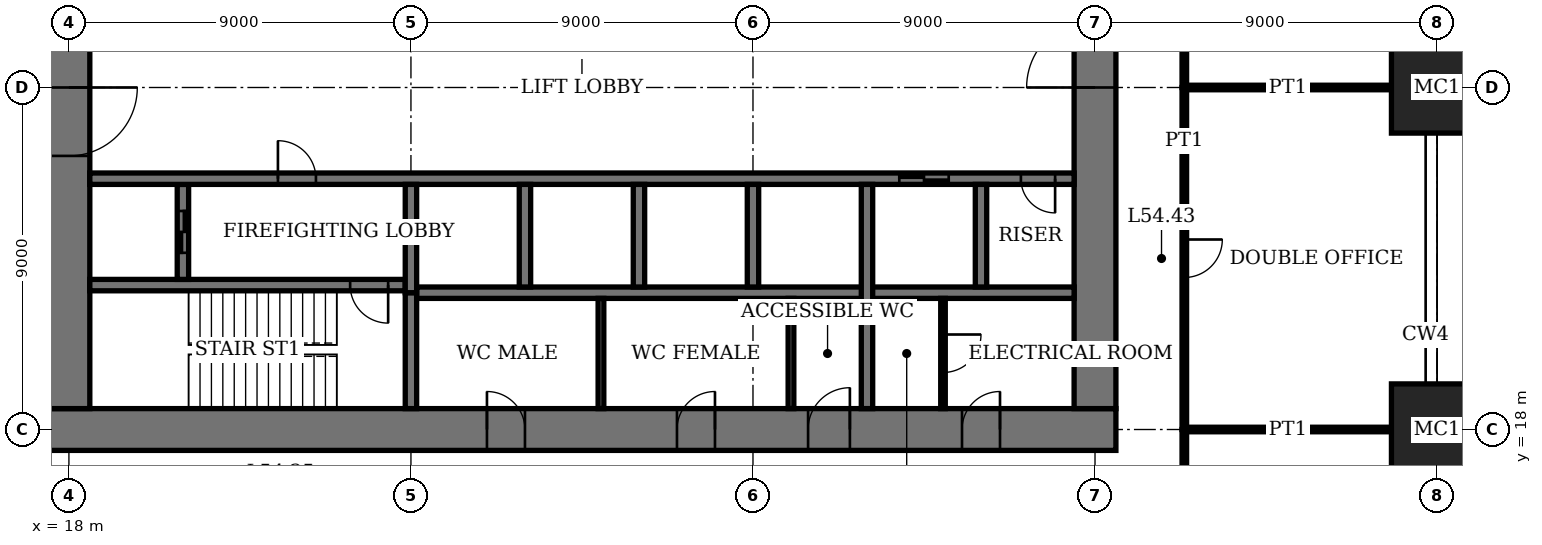
"""IFC4 building model, lengths in metres.
Left out: names, types, materials, properties, quantities, classifications, styles, units other than length and angle.
Written with IfcOpenShell. Run it as: python <this file> out.ifc"""

import sys

from ifc_helpers import new_model, si_unit, direction, frame, frame_2d, origin, origin_2d, place, context, subcontext, project, spatial, rectangle, extrude, element, fill, save


model = new_model("IFC4")
c1 = context("Model", 3, precision=1e-05, world=origin(), true_north=direction((0.0, 1.0)))
c2 = subcontext(c1, "Body", "Model", "MODEL_VIEW")
j1 = project(units=[si_unit("LENGTHUNIT", "METRE"), si_unit("PLANEANGLEUNIT", "RADIAN")], contexts=[c1])
p1 = place(None, origin())
s1 = spatial("IfcSite", under=j1, at=p1, CompositionType="ELEMENT")
p2 = place(p1, origin())
s2 = spatial("IfcBuilding", under=s1, at=p2, CompositionType="ELEMENT")
p3 = place(p2, frame((0.0, 0.0, 222.2)))
s3 = spatial("IfcBuildingStorey", under=s2, at=p3, CompositionType="ELEMENT", Elevation=222.2)
for number, where, z_axis, x_axis in (
    (1, (54.0, 18.0, 0.0), (0.0, 0.0, 1.0), (1.0, 0.0, 0.0)),
    (2, (54.0, 27.0, 0.0), (0.0, 0.0, 1.0), (1.0, 0.0, 0.0)),
):
    element("IfcColumn", number, at=place(p3, frame(where, z_axis=z_axis, x_axis=x_axis)), inside=s3, PredefinedType="COLUMN", context=c2, shape_type="SweptSolid", body=[
        extrude(rectangle(XDim=2.4, YDim=2.4, at=origin_2d()), origin(), (0.0, 0.0, 1.0), 4.0),
    ])
p4 = place(p3, frame((17.45, 18.0, 0.0), z_axis=(0.0, 0.0, 1.0), x_axis=(1.0, 0.0, 0.0)))
e3 = element("IfcWall", 3, at=p4, inside=s3, PredefinedType="SHEAR", context=c2, shape_type="SweptSolid", body=[
    extrude(rectangle(XDim=28.1, YDim=1.1, at=frame_2d((14.05, 0.0))), origin(), (0.0, 0.0, 1.0), 4.0),
])
p5 = place(p4, frame((11.55, 0.0, 0.0)))
e4 = element("IfcOpeningElement", 4, at=p5, cuts=e3, PredefinedType="OPENING", context=c2, shape_type="SweptSolid", body=[
    extrude(rectangle(XDim=1.0, YDim=2.4, at=frame_2d((0.5, 1.2))), frame((0.0, 0.56, 0.0), z_axis=(0.0, -1.0, 0.0), x_axis=(1.0, 0.0, 0.0)), (0.0, 0.0, 1.0), 1.12),
])
p6 = place(p4, frame((16.55, 0.0, 0.0)))
e5 = element("IfcOpeningElement", 5, at=p6, cuts=e3, PredefinedType="OPENING", context=c2, shape_type="SweptSolid", body=[
    extrude(rectangle(XDim=1.0, YDim=2.4, at=frame_2d((0.5, 1.2))), frame((0.0, 0.56, 0.0), z_axis=(0.0, -1.0, 0.0), x_axis=(1.0, 0.0, 0.0)), (0.0, 0.0, 1.0), 1.12),
])
p7 = place(p4, frame((20.0, 0.0, 0.0)))
e6 = element("IfcOpeningElement", 6, at=p7, cuts=e3, PredefinedType="OPENING", context=c2, shape_type="SweptSolid", body=[
    extrude(rectangle(XDim=1.1, YDim=2.4, at=frame_2d((0.55, 1.2))), frame((0.0, 0.56, 0.0), z_axis=(0.0, -1.0, 0.0), x_axis=(1.0, 0.0, 0.0)), (0.0, 0.0, 1.0), 1.12),
])
p8 = place(p4, frame((24.05, 0.0, 0.0)))
e7 = element("IfcOpeningElement", 7, at=p8, cuts=e3, PredefinedType="OPENING", context=c2, shape_type="SweptSolid", body=[
    extrude(rectangle(XDim=1.0, YDim=2.4, at=frame_2d((0.5, 1.2))), frame((0.0, 0.56, 0.0), z_axis=(0.0, -1.0, 0.0), x_axis=(1.0, 0.0, 0.0)), (0.0, 0.0, 1.0), 1.12),
])
p9 = place(p3, frame((18.0, 35.45, 0.0), z_axis=(0.0, 0.0, 1.0), x_axis=(0.0, -1.0, 0.0)))
e8 = element("IfcWall", 8, at=p9, inside=s3, PredefinedType="SHEAR", context=c2, shape_type="SweptSolid", body=[
    extrude(rectangle(XDim=16.9, YDim=1.1, at=frame_2d((8.45, 0.0))), origin(), (0.0, 0.0, 1.0), 4.0),
])
p10 = place(p9, frame((8.45, 0.0, 0.0)))
e9 = element("IfcOpeningElement", 9, at=p10, cuts=e8, PredefinedType="OPENING", context=c2, shape_type="SweptSolid", body=[
    extrude(rectangle(XDim=1.8, YDim=2.4, at=frame_2d((0.9, 1.2))), frame((0.0, 0.56, 0.0), z_axis=(0.0, -1.0, 0.0), x_axis=(1.0, 0.0, 0.0)), (0.0, 0.0, 1.0), 1.12),
])
p11 = place(p3, frame((45.0, 18.55, 0.0), z_axis=(0.0, 0.0, 1.0), x_axis=(0.0, 1.0, 0.0)))
e10 = element("IfcWall", 10, at=p11, inside=s3, PredefinedType="SHEAR", context=c2, shape_type="SweptSolid", body=[
    extrude(rectangle(XDim=16.9, YDim=1.1, at=frame_2d((8.45, 0.0))), origin(), (0.0, 0.0, 1.0), 4.0),
])
p12 = place(p11, frame((8.45, 0.0, 0.0)))
e11 = element("IfcOpeningElement", 11, at=p12, cuts=e10, PredefinedType="OPENING", context=c2, shape_type="SweptSolid", body=[
    extrude(rectangle(XDim=1.8, YDim=2.4, at=frame_2d((0.9, 1.2))), frame((0.0, 0.56, 0.0), z_axis=(0.0, -1.0, 0.0), x_axis=(1.0, 0.0, 0.0)), (0.0, 0.0, 1.0), 1.12),
])
p13 = place(p3, frame((18.55, 21.8, 0.0), z_axis=(0.0, 0.0, 1.0), x_axis=(1.0, 0.0, 0.0)))
e12 = element("IfcWall", 12, at=p13, inside=s3, PredefinedType="SHEAR", context=c2, shape_type="SweptSolid", body=[
    extrude(rectangle(XDim=8.3, YDim=0.3, at=frame_2d((4.15, 0.0))), origin(), (0.0, 0.0, 1.0), 4.0),
])
p14 = place(p13, frame((6.85, 0.0, 0.0)))
e13 = element("IfcOpeningElement", 13, at=p14, cuts=e12, PredefinedType="OPENING", context=c2, shape_type="SweptSolid", body=[
    extrude(rectangle(XDim=1.0, YDim=2.4, at=frame_2d((0.5, 1.2))), frame((0.0, 0.16, 0.0), z_axis=(0.0, -1.0, 0.0), x_axis=(1.0, 0.0, 0.0)), (0.0, 0.0, 1.0), 0.32),
])
p15 = place(p3, frame((27.0, 18.55, 0.0), z_axis=(0.0, 0.0, 1.0), x_axis=(0.0, 1.0, 0.0)))
e14 = element("IfcWall", 14, at=p15, inside=s3, PredefinedType="SHEAR", context=c2, shape_type="SweptSolid", body=[
    extrude(rectangle(XDim=3.05, YDim=0.3, at=frame_2d((1.525, 0.0))), origin(), (0.0, 0.0, 1.0), 4.0),
])
p16 = place(p3, frame((21.0, 21.95, 0.0), z_axis=(0.0, 0.0, 1.0), x_axis=(0.0, 1.0, 0.0)))
e15 = element("IfcWall", 15, at=p16, inside=s3, PredefinedType="SHEAR", context=c2, shape_type="SweptSolid", body=[
    extrude(rectangle(XDim=2.5, YDim=0.3, at=frame_2d((1.25, 0.0))), origin(), (0.0, 0.0, 1.0), 4.0),
])
p17 = place(p16, frame((0.7, 0.0, 0.0)))
e16 = element("IfcOpeningElement", 16, at=p17, cuts=e15, PredefinedType="OPENING", context=c2, shape_type="SweptSolid", body=[
    extrude(rectangle(XDim=1.1, YDim=2.4, at=frame_2d((0.55, 1.2))), frame((0.0, 0.16, 0.0), z_axis=(0.0, -1.0, 0.0), x_axis=(1.0, 0.0, 0.0)), (0.0, 0.0, 1.0), 0.32),
])
p18 = place(p3, frame((18.55, 24.6, 0.0), z_axis=(0.0, 0.0, 1.0), x_axis=(1.0, 0.0, 0.0)))
e17 = element("IfcWall", 17, at=p18, inside=s3, PredefinedType="SHEAR", context=c2, shape_type="SweptSolid", body=[
    extrude(rectangle(XDim=25.9, YDim=0.3, at=frame_2d((12.95, 0.0))), origin(), (0.0, 0.0, 1.0), 4.0),
])
p19 = place(p18, frame((4.95, 0.0, 0.0)))
e18 = element("IfcOpeningElement", 18, at=p19, cuts=e17, PredefinedType="OPENING", context=c2, shape_type="SweptSolid", body=[
    extrude(rectangle(XDim=1.0, YDim=2.4, at=frame_2d((0.5, 1.2))), frame((0.0, 0.16, 0.0), z_axis=(0.0, -1.0, 0.0), x_axis=(1.0, 0.0, 0.0)), (0.0, 0.0, 1.0), 0.32),
])
p20 = place(p18, frame((24.5, 0.0, 0.0)))
e19 = element("IfcOpeningElement", 19, at=p20, cuts=e17, PredefinedType="OPENING", context=c2, shape_type="SweptSolid", body=[
    extrude(rectangle(XDim=0.9, YDim=2.1, at=frame_2d((0.45, 1.05))), frame((0.0, 0.16, 0.0), z_axis=(0.0, -1.0, 0.0), x_axis=(1.0, 0.0, 0.0)), (0.0, 0.0, 1.0), 0.32),
])
p21 = place(p18, frame((21.3, 0.0, 0.0)))
e20 = element("IfcOpeningElement", 20, at=p21, cuts=e17, PredefinedType="OPENING", context=c2, shape_type="SweptSolid", body=[
    extrude(rectangle(XDim=1.3, YDim=2.4, at=frame_2d((0.65, 1.2))), frame((0.0, 0.16, 0.0), z_axis=(0.0, -1.0, 0.0), x_axis=(1.0, 0.0, 0.0)), (0.0, 0.0, 1.0), 0.32),
])
p22 = place(p3, frame((27.15, 21.6, 0.0), z_axis=(0.0, 0.0, 1.0), x_axis=(1.0, 0.0, 0.0)))
e21 = element("IfcWall", 21, at=p22, inside=s3, PredefinedType="SHEAR", context=c2, shape_type="SweptSolid", body=[
    extrude(rectangle(XDim=17.3, YDim=0.3, at=frame_2d((8.65, 0.0))), origin(), (0.0, 0.0, 1.0), 4.0),
])
for number, where, z_axis, x_axis in (
    (22, (30.0, 21.75, 0.0), (0.0, 0.0, 1.0), (0.0, 1.0, 0.0)),
    (23, (33.0, 21.75, 0.0), (0.0, 0.0, 1.0), (0.0, 1.0, 0.0)),
    (24, (36.0, 21.75, 0.0), (0.0, 0.0, 1.0), (0.0, 1.0, 0.0)),
):
    element("IfcWall", number, at=place(p3, frame(where, z_axis=z_axis, x_axis=x_axis)), inside=s3, PredefinedType="SHEAR", context=c2, shape_type="SweptSolid", body=[
        extrude(rectangle(XDim=2.7, YDim=0.3, at=frame_2d((1.35, 0.0))), origin(), (0.0, 0.0, 1.0), 4.0),
    ])
p23 = place(p3, frame((39.0, 18.55, 0.0), z_axis=(0.0, 0.0, 1.0), x_axis=(0.0, 1.0, 0.0)))
e25 = element("IfcWall", 25, at=p23, inside=s3, PredefinedType="SHEAR", context=c2, shape_type="SweptSolid", body=[
    extrude(rectangle(XDim=5.9, YDim=0.3, at=frame_2d((2.95, 0.0))), origin(), (0.0, 0.0, 1.0), 4.0),
])
p24 = place(p3, frame((42.0, 21.75, 0.0), z_axis=(0.0, 0.0, 1.0), x_axis=(0.0, 1.0, 0.0)))
e26 = element("IfcWall", 26, at=p24, inside=s3, PredefinedType="SHEAR", context=c2, shape_type="SweptSolid", body=[
    extrude(rectangle(XDim=2.7, YDim=0.3, at=frame_2d((1.35, 0.0))), origin(), (0.0, 0.0, 1.0), 4.0),
])
p25 = place(p3, frame((27.0, 21.6, 0.0), z_axis=(0.0, 0.0, 1.0), x_axis=(0.0, 1.0, 0.0)))
e27 = element("IfcWall", 27, at=p25, inside=s3, PredefinedType="SHEAR", context=c2, shape_type="SweptSolid", body=[
    extrude(rectangle(XDim=2.85, YDim=0.3, at=frame_2d((1.425, 0.0))), origin(), (0.0, 0.0, 1.0), 4.0),
])
for number, where, z_axis, x_axis in (
    (28, (47.35, 18.0, 0.0), (0.0, 0.0, 1.0), (1.0, 0.0, 0.0)),
    (29, (47.35, 27.0, 0.0), (0.0, 0.0, 1.0), (1.0, 0.0, 0.0)),
):
    element("IfcWall", number, at=place(p3, frame(where, z_axis=z_axis, x_axis=x_axis)), inside=s3, PredefinedType="PARTITIONING", context=c2, shape_type="SweptSolid", body=[
        extrude(rectangle(XDim=5.45, YDim=0.12, at=frame_2d((2.725, 0.0))), origin(), (0.0, 0.0, 1.0), 3.05),
    ])
p26 = place(p3, frame((47.35, 9.0, 0.0), z_axis=(0.0, 0.0, 1.0), x_axis=(0.0, 1.0, 0.0)))
e30 = element("IfcWall", 30, at=p26, inside=s3, PredefinedType="PARTITIONING", context=c2, shape_type="SweptSolid", body=[
    extrude(rectangle(XDim=9.0, YDim=0.12, at=frame_2d((4.5, 0.0))), origin(), (0.0, 0.0, 1.0), 3.75),
])
p27 = place(p26, frame((4.0, 0.0, 0.0)))
e31 = element("IfcOpeningElement", 31, at=p27, cuts=e30, PredefinedType="OPENING", context=c2, shape_type="SweptSolid", body=[
    extrude(rectangle(XDim=1.0, YDim=2.4, at=frame_2d((0.5, 1.2))), frame((0.0, 0.07, 0.0), z_axis=(0.0, -1.0, 0.0), x_axis=(1.0, 0.0, 0.0)), (0.0, 0.0, 1.0), 0.14),
])
p28 = place(p3, frame((47.35, 18.0, 0.0), z_axis=(0.0, 0.0, 1.0), x_axis=(0.0, 1.0, 0.0)))
e32 = element("IfcWall", 32, at=p28, inside=s3, PredefinedType="PARTITIONING", context=c2, shape_type="SweptSolid", body=[
    extrude(rectangle(XDim=9.0, YDim=0.12, at=frame_2d((4.5, 0.0))), origin(), (0.0, 0.0, 1.0), 3.75),
])
p29 = place(p28, frame((4.0, 0.0, 0.0)))
e33 = element("IfcOpeningElement", 33, at=p29, cuts=e32, PredefinedType="OPENING", context=c2, shape_type="SweptSolid", body=[
    extrude(rectangle(XDim=1.0, YDim=2.4, at=frame_2d((0.5, 1.2))), frame((0.0, 0.07, 0.0), z_axis=(0.0, -1.0, 0.0), x_axis=(1.0, 0.0, 0.0)), (0.0, 0.0, 1.0), 0.14),
])
p30 = place(p3, frame((47.35, 27.0, 0.0), z_axis=(0.0, 0.0, 1.0), x_axis=(0.0, 1.0, 0.0)))
e34 = element("IfcWall", 34, at=p30, inside=s3, PredefinedType="PARTITIONING", context=c2, shape_type="SweptSolid", body=[
    extrude(rectangle(XDim=9.0, YDim=0.12, at=frame_2d((4.5, 0.0))), origin(), (0.0, 0.0, 1.0), 3.75),
])
p31 = place(p30, frame((4.0, 0.0, 0.0)))
e35 = element("IfcOpeningElement", 35, at=p31, cuts=e34, PredefinedType="OPENING", context=c2, shape_type="SweptSolid", body=[
    extrude(rectangle(XDim=1.0, YDim=2.4, at=frame_2d((0.5, 1.2))), frame((0.0, 0.07, 0.0), z_axis=(0.0, -1.0, 0.0), x_axis=(1.0, 0.0, 0.0)), (0.0, 0.0, 1.0), 0.14),
])
for number, where, z_axis, x_axis in (
    (36, (32.0, 18.55, 0.0), (0.0, 0.0, 1.0), (0.0, 1.0, 0.0)),
    (37, (37.0, 18.55, 0.0), (0.0, 0.0, 1.0), (0.0, 1.0, 0.0)),
):
    element("IfcWall", number, at=place(p3, frame(where, z_axis=z_axis, x_axis=x_axis)), inside=s3, PredefinedType="PARTITIONING", context=c2, shape_type="SweptSolid", body=[
        extrude(rectangle(XDim=2.9, YDim=0.15, at=frame_2d((1.45, 0.0))), origin(), (0.0, 0.0, 1.0), 3.75),
    ])
p32 = place(p3, frame((41.0, 18.55, 0.0), z_axis=(0.0, 0.0, 1.0), x_axis=(0.0, 1.0, 0.0)))
e38 = element("IfcWall", 38, at=p32, inside=s3, PredefinedType="PARTITIONING", context=c2, shape_type="SweptSolid", body=[
    extrude(rectangle(XDim=2.9, YDim=0.12, at=frame_2d((1.45, 0.0))), origin(), (0.0, 0.0, 1.0), 3.75),
])
p33 = place(p32, frame((0.95, 0.0, 0.0)))
e39 = element("IfcOpeningElement", 39, at=p33, cuts=e38, PredefinedType="OPENING", context=c2, shape_type="SweptSolid", body=[
    extrude(rectangle(XDim=1.0, YDim=2.4, at=frame_2d((0.5, 1.2))), frame((0.0, 0.07, 0.0), z_axis=(0.0, -1.0, 0.0), x_axis=(1.0, 0.0, 0.0)), (0.0, 0.0, 1.0), 0.14),
])
p34 = place(p10, origin())
e40 = element("IfcDoor", 40, at=p34, inside=s3, OperationType="DOUBLE_DOOR_DOUBLE_SWING", PredefinedType="DOOR", context=c2, shape_type="SweptSolid", body=[
    extrude(rectangle(XDim=1.8, YDim=2.4, at=frame_2d((0.9, 1.2))), frame((0.0, 0.03, 0.0), z_axis=(0.0, -1.0, 0.0), x_axis=(1.0, 0.0, 0.0)), (0.0, 0.0, 1.0), 0.06),
    extrude(rectangle(XDim=0.04, YDim=2.4, at=frame_2d((0.02, 1.2))), frame((0.0, 0.55, 0.0), z_axis=(0.0, -1.0, 0.0), x_axis=(1.0, 0.0, 0.0)), (0.0, 0.0, 1.0), 1.1),
    extrude(rectangle(XDim=0.04, YDim=2.4, at=frame_2d((1.78, 1.2))), frame((0.0, 0.55, 0.0), z_axis=(0.0, -1.0, 0.0), x_axis=(1.0, 0.0, 0.0)), (0.0, 0.0, 1.0), 1.1),
    extrude(rectangle(XDim=1.8, YDim=0.04, at=frame_2d((0.9, 2.38))), frame((0.0, 0.55, 0.0), z_axis=(0.0, -1.0, 0.0), x_axis=(1.0, 0.0, 0.0)), (0.0, 0.0, 1.0), 1.1),
])
fill(e9, e40)
p35 = place(p12, origin())
e41 = element("IfcDoor", 41, at=p35, inside=s3, OperationType="DOUBLE_DOOR_DOUBLE_SWING", PredefinedType="DOOR", context=c2, shape_type="SweptSolid", body=[
    extrude(rectangle(XDim=1.8, YDim=2.4, at=frame_2d((0.9, 1.2))), frame((0.0, 0.03, 0.0), z_axis=(0.0, -1.0, 0.0), x_axis=(1.0, 0.0, 0.0)), (0.0, 0.0, 1.0), 0.06),
    extrude(rectangle(XDim=0.04, YDim=2.4, at=frame_2d((0.02, 1.2))), frame((0.0, 0.55, 0.0), z_axis=(0.0, -1.0, 0.0), x_axis=(1.0, 0.0, 0.0)), (0.0, 0.0, 1.0), 1.1),
    extrude(rectangle(XDim=0.04, YDim=2.4, at=frame_2d((1.78, 1.2))), frame((0.0, 0.55, 0.0), z_axis=(0.0, -1.0, 0.0), x_axis=(1.0, 0.0, 0.0)), (0.0, 0.0, 1.0), 1.1),
    extrude(rectangle(XDim=1.8, YDim=0.04, at=frame_2d((0.9, 2.38))), frame((0.0, 0.55, 0.0), z_axis=(0.0, -1.0, 0.0), x_axis=(1.0, 0.0, 0.0)), (0.0, 0.0, 1.0), 1.1),
])
fill(e11, e41)
p36 = place(p5, origin())
e42 = element("IfcDoor", 42, at=p36, inside=s3, OperationType="SINGLE_SWING_RIGHT", PredefinedType="DOOR", context=c2, shape_type="SweptSolid", body=[
    extrude(rectangle(XDim=1.0, YDim=2.4, at=frame_2d((0.5, 1.2))), frame((0.0, 0.025, 0.0), z_axis=(0.0, -1.0, 0.0), x_axis=(1.0, 0.0, 0.0)), (0.0, 0.0, 1.0), 0.05),
    extrude(rectangle(XDim=0.04, YDim=2.4, at=frame_2d((0.02, 1.2))), frame((0.0, 0.4, 0.0), z_axis=(0.0, -1.0, 0.0), x_axis=(1.0, 0.0, 0.0)), (0.0, 0.0, 1.0), 0.8),
    extrude(rectangle(XDim=0.04, YDim=2.4, at=frame_2d((0.98, 1.2))), frame((0.0, 0.4, 0.0), z_axis=(0.0, -1.0, 0.0), x_axis=(1.0, 0.0, 0.0)), (0.0, 0.0, 1.0), 0.8),
    extrude(rectangle(XDim=1.0, YDim=0.04, at=frame_2d((0.5, 2.38))), frame((0.0, 0.4, 0.0), z_axis=(0.0, -1.0, 0.0), x_axis=(1.0, 0.0, 0.0)), (0.0, 0.0, 1.0), 0.8),
])
fill(e4, e42)
p37 = place(p6, origin())
e43 = element("IfcDoor", 43, at=p37, inside=s3, OperationType="SINGLE_SWING_LEFT", PredefinedType="DOOR", context=c2, shape_type="SweptSolid", body=[
    extrude(rectangle(XDim=1.0, YDim=2.4, at=frame_2d((0.5, 1.2))), frame((0.0, 0.025, 0.0), z_axis=(0.0, -1.0, 0.0), x_axis=(1.0, 0.0, 0.0)), (0.0, 0.0, 1.0), 0.05),
    extrude(rectangle(XDim=0.04, YDim=2.4, at=frame_2d((0.02, 1.2))), frame((0.0, 0.4, 0.0), z_axis=(0.0, -1.0, 0.0), x_axis=(1.0, 0.0, 0.0)), (0.0, 0.0, 1.0), 0.8),
    extrude(rectangle(XDim=0.04, YDim=2.4, at=frame_2d((0.98, 1.2))), frame((0.0, 0.4, 0.0), z_axis=(0.0, -1.0, 0.0), x_axis=(1.0, 0.0, 0.0)), (0.0, 0.0, 1.0), 0.8),
    extrude(rectangle(XDim=1.0, YDim=0.04, at=frame_2d((0.5, 2.38))), frame((0.0, 0.4, 0.0), z_axis=(0.0, -1.0, 0.0), x_axis=(1.0, 0.0, 0.0)), (0.0, 0.0, 1.0), 0.8),
])
fill(e5, e43)
p38 = place(p7, origin())
e44 = element("IfcDoor", 44, at=p38, inside=s3, OperationType="SINGLE_SWING_LEFT", PredefinedType="DOOR", context=c2, shape_type="SweptSolid", body=[
    extrude(rectangle(XDim=1.1, YDim=2.4, at=frame_2d((0.55, 1.2))), frame((0.0, 0.025, 0.0), z_axis=(0.0, -1.0, 0.0), x_axis=(1.0, 0.0, 0.0)), (0.0, 0.0, 1.0), 0.05),
    extrude(rectangle(XDim=0.04, YDim=2.4, at=frame_2d((0.02, 1.2))), frame((0.0, 0.44, 0.0), z_axis=(0.0, -1.0, 0.0), x_axis=(1.0, 0.0, 0.0)), (0.0, 0.0, 1.0), 0.88),
    extrude(rectangle(XDim=0.04, YDim=2.4, at=frame_2d((1.08, 1.2))), frame((0.0, 0.44, 0.0), z_axis=(0.0, -1.0, 0.0), x_axis=(1.0, 0.0, 0.0)), (0.0, 0.0, 1.0), 0.88),
    extrude(rectangle(XDim=1.1, YDim=0.04, at=frame_2d((0.55, 2.38))), frame((0.0, 0.44, 0.0), z_axis=(0.0, -1.0, 0.0), x_axis=(1.0, 0.0, 0.0)), (0.0, 0.0, 1.0), 0.88),
])
fill(e6, e44)
p39 = place(p8, origin())
e45 = element("IfcDoor", 45, at=p39, inside=s3, OperationType="SINGLE_SWING_LEFT", PredefinedType="DOOR", context=c2, shape_type="SweptSolid", body=[
    extrude(rectangle(XDim=1.0, YDim=2.4, at=frame_2d((0.5, 1.2))), frame((0.0, 0.025, 0.0), z_axis=(0.0, -1.0, 0.0), x_axis=(1.0, 0.0, 0.0)), (0.0, 0.0, 1.0), 0.05),
    extrude(rectangle(XDim=0.04, YDim=2.4, at=frame_2d((0.02, 1.2))), frame((0.0, 0.4, 0.0), z_axis=(0.0, -1.0, 0.0), x_axis=(1.0, 0.0, 0.0)), (0.0, 0.0, 1.0), 0.8),
    extrude(rectangle(XDim=0.04, YDim=2.4, at=frame_2d((0.98, 1.2))), frame((0.0, 0.4, 0.0), z_axis=(0.0, -1.0, 0.0), x_axis=(1.0, 0.0, 0.0)), (0.0, 0.0, 1.0), 0.8),
    extrude(rectangle(XDim=1.0, YDim=0.04, at=frame_2d((0.5, 2.38))), frame((0.0, 0.4, 0.0), z_axis=(0.0, -1.0, 0.0), x_axis=(1.0, 0.0, 0.0)), (0.0, 0.0, 1.0), 0.8),
])
fill(e7, e45)
p40 = place(p14, origin())
e46 = element("IfcDoor", 46, at=p40, inside=s3, OperationType="SINGLE_SWING_RIGHT", PredefinedType="DOOR", context=c2, shape_type="SweptSolid", body=[
    extrude(rectangle(XDim=1.0, YDim=2.4, at=frame_2d((0.5, 1.2))), frame((0.0, 0.03, 0.0), z_axis=(0.0, -1.0, 0.0), x_axis=(1.0, 0.0, 0.0)), (0.0, 0.0, 1.0), 0.06),
])
fill(e13, e46)
p41 = place(p19, origin())
e47 = element("IfcDoor", 47, at=p41, inside=s3, OperationType="SINGLE_SWING_RIGHT", PredefinedType="DOOR", context=c2, shape_type="SweptSolid", body=[
    extrude(rectangle(XDim=1.0, YDim=2.4, at=frame_2d((0.5, 1.2))), frame((0.0, 0.03, 0.0), z_axis=(0.0, -1.0, 0.0), x_axis=(1.0, 0.0, 0.0)), (0.0, 0.0, 1.0), 0.06),
])
fill(e18, e47)
p42 = place(p20, origin())
e48 = element("IfcDoor", 48, at=p42, inside=s3, OperationType="SINGLE_SWING_RIGHT", PredefinedType="DOOR", context=c2, shape_type="SweptSolid", body=[
    extrude(rectangle(XDim=0.9, YDim=2.1, at=frame_2d((0.45, 1.05))), frame((0.0, 0.03, 0.0), z_axis=(0.0, -1.0, 0.0), x_axis=(1.0, 0.0, 0.0)), (0.0, 0.0, 1.0), 0.06),
])
fill(e19, e48)
p43 = place(p29, origin())
e49 = element("IfcDoor", 49, at=p43, inside=s3, OperationType="SINGLE_SWING_RIGHT", PredefinedType="DOOR", context=c2, shape_type="SweptSolid", body=[
    extrude(rectangle(XDim=1.0, YDim=2.4, at=frame_2d((0.5, 1.2))), frame((0.0, 0.025, 0.0), z_axis=(0.0, -1.0, 0.0), x_axis=(1.0, 0.0, 0.0)), (0.0, 0.0, 1.0), 0.05),
])
fill(e33, e49)
p44 = place(p33, origin())
e50 = element("IfcDoor", 50, at=p44, inside=s3, OperationType="SINGLE_SWING_RIGHT", PredefinedType="DOOR", context=c2, shape_type="SweptSolid", body=[
    extrude(rectangle(XDim=1.0, YDim=2.4, at=frame_2d((0.5, 1.2))), frame((0.0, 0.03, 0.0), z_axis=(0.0, -1.0, 0.0), x_axis=(1.0, 0.0, 0.0)), (0.0, 0.0, 1.0), 0.06),
])
fill(e39, e50)
p45 = place(p21, origin())
e51 = element("IfcDoor", 51, at=p45, inside=s3, OperationType="DOUBLE_DOOR_SLIDING", PredefinedType="DOOR", context=c2, shape_type="SweptSolid", body=[
    extrude(rectangle(XDim=1.3, YDim=2.4, at=frame_2d((0.65, 1.2))), frame((0.0, 0.02, 0.0), z_axis=(0.0, -1.0, 0.0), x_axis=(1.0, 0.0, 0.0)), (0.0, 0.0, 1.0), 0.04),
])
fill(e20, e51)
p46 = place(p17, origin())
e52 = element("IfcDoor", 52, at=p46, inside=s3, OperationType="DOUBLE_DOOR_SLIDING", PredefinedType="DOOR", context=c2, shape_type="SweptSolid", body=[
    extrude(rectangle(XDim=1.1, YDim=2.4, at=frame_2d((0.55, 1.2))), frame((0.0, 0.03, 0.0), z_axis=(0.0, -1.0, 0.0), x_axis=(1.0, 0.0, 0.0)), (0.0, 0.0, 1.0), 0.06),
])
fill(e16, e52)
save(model, sys.argv[1])
